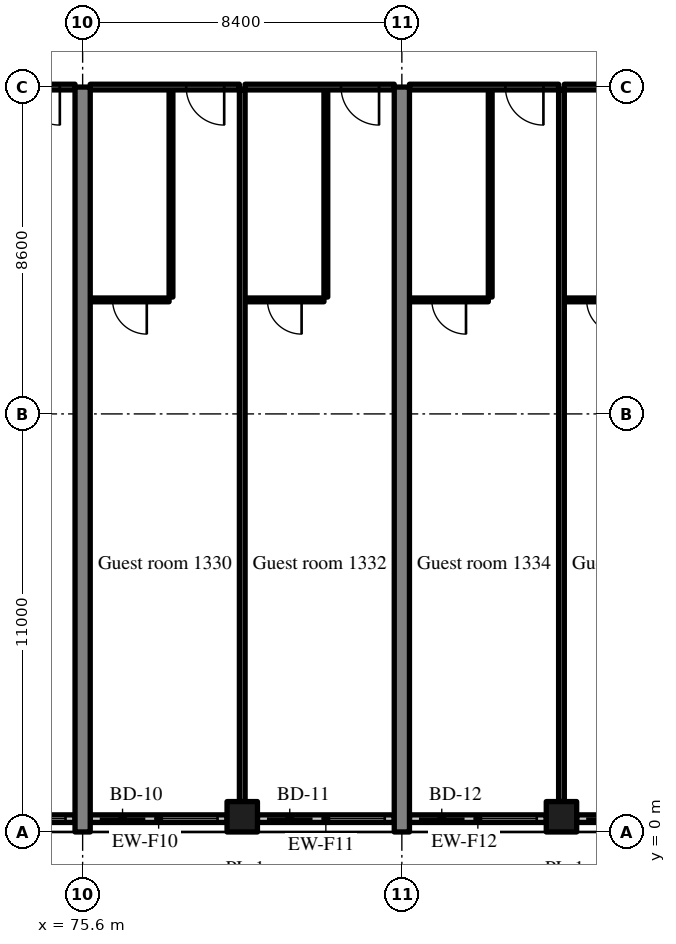
"""IFC4 building model, lengths in metres.
Left out: names, types, materials, properties, quantities, classifications, styles, units other than length and angle.
Written with IfcOpenShell. Run it as: python <this file> out.ifc"""

import sys

from ifc_helpers import new_model, si_unit, direction, frame, frame_2d, origin, origin_2d, place, context, subcontext, project, spatial, rectangle, extrude, source, transform, mapped, element, fill, save


model = new_model("IFC4")
c1 = context("Model", 3, precision=1e-05, world=origin(), true_north=direction((0.0, 1.0)))
c2 = subcontext(c1, "Body", "Model", "MODEL_VIEW")
j1 = project(units=[si_unit("LENGTHUNIT", "METRE"), si_unit("PLANEANGLEUNIT", "RADIAN")], contexts=[c1])
p1 = place(None, origin())
s1 = spatial("IfcSite", under=j1, at=p1, CompositionType="ELEMENT")
p2 = place(p1, origin())
s2 = spatial("IfcBuilding", under=s1, at=p2, CompositionType="ELEMENT")
p3 = place(p2, frame((0.0, 0.0, 58.2)))
s3 = spatial("IfcBuildingStorey", under=s2, at=p3, CompositionType="ELEMENT", Elevation=58.2)
m1 = source(origin(), c2, "Body", "SweptSolid", [
    extrude(rectangle(XDim=19.6, YDim=0.4, at=frame_2d((9.8, 0.0))), origin(), (0.0, 0.0, 1.0), 3.52),
])
for number, where, z_axis, x_axis in (
    (1, (75.6, 0.0, 0.0), (0.0, 0.0, 1.0), (0.0, 1.0, 0.0)),
    (2, (84.0, 0.0, 0.0), (0.0, 0.0, 1.0), (0.0, 1.0, 0.0)),
):
    element("IfcWall", number, at=place(p3, frame(where, z_axis=z_axis, x_axis=x_axis)), inside=s3, PredefinedType="SHEAR", context=c2, shape_type="MappedRepresentation", body=[
        mapped(m1, transform((0.0, 0.0, 0.0), scale=1.0)),
    ])
m2 = source(origin(), c2, "Body", "SweptSolid", [
    extrude(rectangle(XDim=0.8, YDim=0.8, at=origin_2d()), origin(), (0.0, 0.0, 1.0), 3.52),
])
for number, where, z_axis, x_axis in (
    (3, (79.8, 0.4, 0.0), (0.0, 0.0, 1.0), (1.0, 0.0, 0.0)),
    (4, (88.2, 0.4, 0.0), (0.0, 0.0, 1.0), (1.0, 0.0, 0.0)),
):
    element("IfcColumn", number, at=place(p3, frame(where, z_axis=z_axis, x_axis=x_axis)), inside=s3, PredefinedType="COLUMN", context=c2, shape_type="MappedRepresentation", body=[
        mapped(m2, transform((0.0, 0.0, 0.0), scale=1.0)),
    ])
m3 = source(origin(), c2, "Body", "SweptSolid", [
    extrude(rectangle(XDim=3.6, YDim=0.2, at=frame_2d((1.8, 0.0))), origin(), (0.0, 0.0, 1.0), 2.82),
])
p4 = place(p3, frame((71.8, 0.35, 0.0), z_axis=(0.0, 0.0, 1.0), x_axis=(1.0, 0.0, 0.0)))
e5 = element("IfcWall", 5, at=p4, inside=s3, PredefinedType="SOLIDWALL", context=c2, shape_type="MappedRepresentation", body=[
    mapped(m3, transform((0.0, 0.0, 0.0), scale=1.0)),
])
m4 = source(origin(), c2, "Body", "SweptSolid", [
    extrude(rectangle(XDim=1.2, YDim=2.4, at=frame_2d((0.6, 1.2))), frame((0.0, 0.11, 0.0), z_axis=(0.0, -1.0, 0.0), x_axis=(1.0, 0.0, 0.0)), (0.0, 0.0, 1.0), 0.22),
])
p5 = place(p4, frame((0.25, 0.0, 0.0)))
e6 = element("IfcOpeningElement", 6, at=p5, cuts=e5, PredefinedType="OPENING", context=c2, shape_type="MappedRepresentation", body=[
    mapped(m4, transform((0.0, 0.0, 0.0), scale=1.0)),
])
m5 = source(origin(), c2, "Body", "SweptSolid", [
    extrude(rectangle(XDim=1.5, YDim=1.5, at=frame_2d((0.75, 0.75))), frame((0.0, 0.11, 0.0), z_axis=(0.0, -1.0, 0.0), x_axis=(1.0, 0.0, 0.0)), (0.0, 0.0, 1.0), 0.22),
])
p6 = place(p4, frame((1.85, 0.0, 0.9)))
e7 = element("IfcOpeningElement", 7, at=p6, cuts=e5, PredefinedType="OPENING", context=c2, shape_type="MappedRepresentation", body=[
    mapped(m5, transform((0.0, 0.0, 0.0), scale=1.0)),
])
p7 = place(p3, frame((75.8, 0.35, 0.0), z_axis=(0.0, 0.0, 1.0), x_axis=(1.0, 0.0, 0.0)))
e8 = element("IfcWall", 8, at=p7, inside=s3, PredefinedType="SOLIDWALL", context=c2, shape_type="MappedRepresentation", body=[
    mapped(m3, transform((0.0, 0.0, 0.0), scale=1.0)),
])
p8 = place(p7, frame((0.25, 0.0, 0.0)))
e9 = element("IfcOpeningElement", 9, at=p8, cuts=e8, PredefinedType="OPENING", context=c2, shape_type="MappedRepresentation", body=[
    mapped(m4, transform((0.0, 0.0, 0.0), scale=1.0)),
])
p9 = place(p7, frame((1.85, 0.0, 0.9)))
e10 = element("IfcOpeningElement", 10, at=p9, cuts=e8, PredefinedType="OPENING", context=c2, shape_type="MappedRepresentation", body=[
    mapped(m5, transform((0.0, 0.0, 0.0), scale=1.0)),
])
m6 = source(origin(), c2, "Body", "SweptSolid", [
    extrude(rectangle(XDim=3.6, YDim=0.2, at=frame_2d((1.8, 0.0))), origin(), (0.0, 0.0, 1.0), 2.82),
])
p10 = place(p3, frame((80.2, 0.35, 0.0), z_axis=(0.0, 0.0, 1.0), x_axis=(1.0, 0.0, 0.0)))
e11 = element("IfcWall", 11, at=p10, inside=s3, PredefinedType="SOLIDWALL", context=c2, shape_type="MappedRepresentation", body=[
    mapped(m6, transform((0.0, 0.0, 0.0), scale=1.0)),
])
p11 = place(p10, frame((0.25, 0.0, 0.0)))
e12 = element("IfcOpeningElement", 12, at=p11, cuts=e11, PredefinedType="OPENING", context=c2, shape_type="MappedRepresentation", body=[
    mapped(m4, transform((0.0, 0.0, 0.0), scale=1.0)),
])
p12 = place(p10, frame((1.85, 0.0, 0.9)))
e13 = element("IfcOpeningElement", 13, at=p12, cuts=e11, PredefinedType="OPENING", context=c2, shape_type="MappedRepresentation", body=[
    mapped(m5, transform((0.0, 0.0, 0.0), scale=1.0)),
])
p13 = place(p3, frame((84.2, 0.35, 0.0), z_axis=(0.0, 0.0, 1.0), x_axis=(1.0, 0.0, 0.0)))
e14 = element("IfcWall", 14, at=p13, inside=s3, PredefinedType="SOLIDWALL", context=c2, shape_type="MappedRepresentation", body=[
    mapped(m6, transform((0.0, 0.0, 0.0), scale=1.0)),
])
p14 = place(p13, frame((0.25, 0.0, 0.0)))
e15 = element("IfcOpeningElement", 15, at=p14, cuts=e14, PredefinedType="OPENING", context=c2, shape_type="MappedRepresentation", body=[
    mapped(m4, transform((0.0, 0.0, 0.0), scale=1.0)),
])
p15 = place(p13, frame((1.85, 0.0, 0.9)))
e16 = element("IfcOpeningElement", 16, at=p15, cuts=e14, PredefinedType="OPENING", context=c2, shape_type="MappedRepresentation", body=[
    mapped(m5, transform((0.0, 0.0, 0.0), scale=1.0)),
])
p16 = place(p3, frame((88.6, 0.35, 0.0), z_axis=(0.0, 0.0, 1.0), x_axis=(1.0, 0.0, 0.0)))
e17 = element("IfcWall", 17, at=p16, inside=s3, PredefinedType="SOLIDWALL", context=c2, shape_type="MappedRepresentation", body=[
    mapped(m3, transform((0.0, 0.0, 0.0), scale=1.0)),
])
p17 = place(p16, frame((0.25, 0.0, 0.0)))
e18 = element("IfcOpeningElement", 18, at=p17, cuts=e17, PredefinedType="OPENING", context=c2, shape_type="MappedRepresentation", body=[
    mapped(m4, transform((0.0, 0.0, 0.0), scale=1.0)),
])
p18 = place(p16, frame((1.85, 0.0, 0.9)))
e19 = element("IfcOpeningElement", 19, at=p18, cuts=e17, PredefinedType="OPENING", context=c2, shape_type="MappedRepresentation", body=[
    mapped(m5, transform((0.0, 0.0, 0.0), scale=1.0)),
])
m7 = source(origin(), c2, "Body", "SweptSolid", [
    extrude(rectangle(XDim=8.0, YDim=0.15, at=frame_2d((4.0, 0.0))), origin(), (0.0, 0.0, 1.0), 2.82),
])
p19 = place(p3, frame((67.4, 19.6, 0.0), z_axis=(0.0, 0.0, 1.0), x_axis=(1.0, 0.0, 0.0)))
e20 = element("IfcWall", 20, at=p19, inside=s3, PredefinedType="PARTITIONING", context=c2, shape_type="MappedRepresentation", body=[
    mapped(m7, transform((0.0, 0.0, 0.0), scale=1.0)),
])
m8 = source(origin(), c2, "Body", "SweptSolid", [
    extrude(rectangle(XDim=1.0, YDim=2.1, at=frame_2d((0.5, 1.05))), frame((0.0, 0.085, 0.0), z_axis=(0.0, -1.0, 0.0), x_axis=(1.0, 0.0, 0.0)), (0.0, 0.0, 1.0), 0.17),
])
p20 = place(p19, frame((6.6, 0.0, 0.0)))
e21 = element("IfcOpeningElement", 21, at=p20, cuts=e20, PredefinedType="OPENING", context=c2, shape_type="MappedRepresentation", body=[
    mapped(m8, transform((0.0, 0.0, 0.0), scale=1.0)),
])
m9 = source(origin(), c2, "Body", "SweptSolid", [
    extrude(rectangle(XDim=5.45, YDim=0.1, at=frame_2d((2.725, 0.0))), origin(), (0.0, 0.0, 1.0), 3.52),
])
p21 = place(p3, frame((77.925, 14.075, 0.0), z_axis=(0.0, 0.0, 1.0), x_axis=(0.0, 1.0, 0.0)))
e22 = element("IfcWall", 22, at=p21, inside=s3, PredefinedType="PARTITIONING", context=c2, shape_type="MappedRepresentation", body=[
    mapped(m9, transform((0.0, 0.0, 0.0), scale=1.0)),
])
m10 = source(origin(), c2, "Body", "SweptSolid", [
    extrude(rectangle(XDim=2.075, YDim=0.1, at=frame_2d((1.038, 0.0))), origin(), (0.0, 0.0, 1.0), 3.52),
])
p22 = place(p3, frame((75.8, 14.0, 0.0), z_axis=(0.0, 0.0, 1.0), x_axis=(1.0, 0.0, 0.0)))
e23 = element("IfcWall", 23, at=p22, inside=s3, PredefinedType="PARTITIONING", context=c2, shape_type="MappedRepresentation", body=[
    mapped(m10, transform((0.0, 0.0, 0.0), scale=1.0)),
])
m11 = source(origin(), c2, "Body", "SweptSolid", [
    extrude(rectangle(XDim=0.9, YDim=2.1, at=frame_2d((0.45, 1.05))), frame((0.0, 0.06, 0.0), z_axis=(0.0, -1.0, 0.0), x_axis=(1.0, 0.0, 0.0)), (0.0, 0.0, 1.0), 0.12),
])
p23 = place(p22, frame((0.588, 0.0, 0.0)))
e24 = element("IfcOpeningElement", 24, at=p23, cuts=e23, PredefinedType="OPENING", context=c2, shape_type="MappedRepresentation", body=[
    mapped(m11, transform((0.0, 0.0, 0.0), scale=1.0)),
])
m12 = source(origin(), c2, "Body", "SweptSolid", [
    extrude(rectangle(XDim=3.925, YDim=0.15, at=frame_2d((1.962, 0.0))), origin(), (0.0, 0.0, 1.0), 2.82),
])
p24 = place(p3, frame((75.8, 19.6, 0.0), z_axis=(0.0, 0.0, 1.0), x_axis=(1.0, 0.0, 0.0)))
e25 = element("IfcWall", 25, at=p24, inside=s3, PredefinedType="PARTITIONING", context=c2, shape_type="MappedRepresentation", body=[
    mapped(m12, transform((0.0, 0.0, 0.0), scale=1.0)),
])
p25 = place(p24, frame((2.525, 0.0, 0.0)))
e26 = element("IfcOpeningElement", 26, at=p25, cuts=e25, PredefinedType="OPENING", context=c2, shape_type="MappedRepresentation", body=[
    mapped(m8, transform((0.0, 0.0, 0.0), scale=1.0)),
])
p26 = place(p3, frame((82.0, 14.075, 0.0), z_axis=(0.0, 0.0, 1.0), x_axis=(0.0, 1.0, 0.0)))
e27 = element("IfcWall", 27, at=p26, inside=s3, PredefinedType="PARTITIONING", context=c2, shape_type="MappedRepresentation", body=[
    mapped(m9, transform((0.0, 0.0, 0.0), scale=1.0)),
])
p27 = place(p3, frame((79.875, 14.0, 0.0), z_axis=(0.0, 0.0, 1.0), x_axis=(1.0, 0.0, 0.0)))
e28 = element("IfcWall", 28, at=p27, inside=s3, PredefinedType="PARTITIONING", context=c2, shape_type="MappedRepresentation", body=[
    mapped(m10, transform((0.0, 0.0, 0.0), scale=1.0)),
])
p28 = place(p27, frame((0.587, 0.0, 0.0)))
e29 = element("IfcOpeningElement", 29, at=p28, cuts=e28, PredefinedType="OPENING", context=c2, shape_type="MappedRepresentation", body=[
    mapped(m11, transform((0.0, 0.0, 0.0), scale=1.0)),
])
p29 = place(p3, frame((79.875, 19.6, 0.0), z_axis=(0.0, 0.0, 1.0), x_axis=(1.0, 0.0, 0.0)))
e30 = element("IfcWall", 30, at=p29, inside=s3, PredefinedType="PARTITIONING", context=c2, shape_type="MappedRepresentation", body=[
    mapped(m12, transform((0.0, 0.0, 0.0), scale=1.0)),
])
p30 = place(p29, frame((2.525, 0.0, 0.0)))
e31 = element("IfcOpeningElement", 31, at=p30, cuts=e30, PredefinedType="OPENING", context=c2, shape_type="MappedRepresentation", body=[
    mapped(m8, transform((0.0, 0.0, 0.0), scale=1.0)),
])
m13 = source(origin(), c2, "Body", "SweptSolid", [
    extrude(rectangle(XDim=18.725, YDim=0.15, at=frame_2d((9.362, 0.0))), origin(), (0.0, 0.0, 1.0), 3.52),
])
p31 = place(p3, frame((79.8, 0.8, 0.0), z_axis=(0.0, 0.0, 1.0), x_axis=(0.0, 1.0, 0.0)))
e32 = element("IfcWall", 32, at=p31, inside=s3, PredefinedType="PARTITIONING", context=c2, shape_type="MappedRepresentation", body=[
    mapped(m13, transform((0.0, 0.0, 0.0), scale=1.0)),
])
p32 = place(p3, frame((86.325, 14.075, 0.0), z_axis=(0.0, 0.0, 1.0), x_axis=(0.0, 1.0, 0.0)))
e33 = element("IfcWall", 33, at=p32, inside=s3, PredefinedType="PARTITIONING", context=c2, shape_type="MappedRepresentation", body=[
    mapped(m9, transform((0.0, 0.0, 0.0), scale=1.0)),
])
p33 = place(p3, frame((84.2, 14.0, 0.0), z_axis=(0.0, 0.0, 1.0), x_axis=(1.0, 0.0, 0.0)))
e34 = element("IfcWall", 34, at=p33, inside=s3, PredefinedType="PARTITIONING", context=c2, shape_type="MappedRepresentation", body=[
    mapped(m10, transform((0.0, 0.0, 0.0), scale=1.0)),
])
p34 = place(p33, frame((0.588, 0.0, 0.0)))
e35 = element("IfcOpeningElement", 35, at=p34, cuts=e34, PredefinedType="OPENING", context=c2, shape_type="MappedRepresentation", body=[
    mapped(m11, transform((0.0, 0.0, 0.0), scale=1.0)),
])
p35 = place(p3, frame((84.2, 19.6, 0.0), z_axis=(0.0, 0.0, 1.0), x_axis=(1.0, 0.0, 0.0)))
e36 = element("IfcWall", 36, at=p35, inside=s3, PredefinedType="PARTITIONING", context=c2, shape_type="MappedRepresentation", body=[
    mapped(m12, transform((0.0, 0.0, 0.0), scale=1.0)),
])
p36 = place(p35, frame((2.525, 0.0, 0.0)))
e37 = element("IfcOpeningElement", 37, at=p36, cuts=e36, PredefinedType="OPENING", context=c2, shape_type="MappedRepresentation", body=[
    mapped(m8, transform((0.0, 0.0, 0.0), scale=1.0)),
])
m14 = source(origin(), c2, "Body", "SweptSolid", [
    extrude(rectangle(XDim=2.075, YDim=0.1, at=frame_2d((1.038, 0.0))), origin(), (0.0, 0.0, 1.0), 3.52),
])
p37 = place(p3, frame((88.275, 14.0, 0.0), z_axis=(0.0, 0.0, 1.0), x_axis=(1.0, 0.0, 0.0)))
e38 = element("IfcWall", 38, at=p37, inside=s3, PredefinedType="PARTITIONING", context=c2, shape_type="MappedRepresentation", body=[
    mapped(m14, transform((0.0, 0.0, 0.0), scale=1.0)),
])
p38 = place(p37, frame((0.587, 0.0, 0.0)))
e39 = element("IfcOpeningElement", 39, at=p38, cuts=e38, PredefinedType="OPENING", context=c2, shape_type="MappedRepresentation", body=[
    mapped(m11, transform((0.0, 0.0, 0.0), scale=1.0)),
])
p39 = place(p3, frame((88.275, 19.6, 0.0), z_axis=(0.0, 0.0, 1.0), x_axis=(1.0, 0.0, 0.0)))
e40 = element("IfcWall", 40, at=p39, inside=s3, PredefinedType="PARTITIONING", context=c2, shape_type="MappedRepresentation", body=[
    mapped(m12, transform((0.0, 0.0, 0.0), scale=1.0)),
])
p40 = place(p39, frame((2.525, 0.0, 0.0)))
e41 = element("IfcOpeningElement", 41, at=p40, cuts=e40, PredefinedType="OPENING", context=c2, shape_type="MappedRepresentation", body=[
    mapped(m8, transform((0.0, 0.0, 0.0), scale=1.0)),
])
p41 = place(p3, frame((88.2, 0.8, 0.0), z_axis=(0.0, 0.0, 1.0), x_axis=(0.0, 1.0, 0.0)))
e42 = element("IfcWall", 42, at=p41, inside=s3, PredefinedType="PARTITIONING", context=c2, shape_type="MappedRepresentation", body=[
    mapped(m13, transform((0.0, 0.0, 0.0), scale=1.0)),
])
m15 = source(origin(), c2, "Body", "SweptSolid", [
    extrude(rectangle(XDim=1.5, YDim=1.5, at=frame_2d((0.75, 0.75))), frame((0.0, 0.03, 0.0), z_axis=(0.0, -1.0, 0.0), x_axis=(1.0, 0.0, 0.0)), (0.0, 0.0, 1.0), 0.06),
])
p42 = place(p6, origin())
e43 = element("IfcWindow", 43, at=p42, inside=s3, PartitioningType="SINGLE_PANEL", PredefinedType="WINDOW", context=c2, shape_type="MappedRepresentation", body=[
    mapped(m15, transform((0.0, 0.0, 0.0), scale=1.0)),
])
fill(e7, e43)
m16 = source(origin(), c2, "Body", "SweptSolid", [
    extrude(rectangle(XDim=1.2, YDim=2.4, at=frame_2d((0.6, 1.2))), frame((0.0, 0.025, 0.0), z_axis=(0.0, -1.0, 0.0), x_axis=(1.0, 0.0, 0.0)), (0.0, 0.0, 1.0), 0.05),
])
p43 = place(p8, origin())
e44 = element("IfcDoor", 44, at=p43, inside=s3, OperationType="SLIDING_TO_RIGHT", PredefinedType="DOOR", context=c2, shape_type="MappedRepresentation", body=[
    mapped(m16, transform((0.0, 0.0, 0.0), scale=1.0)),
])
fill(e9, e44)
p44 = place(p9, origin())
e45 = element("IfcWindow", 45, at=p44, inside=s3, PartitioningType="SINGLE_PANEL", PredefinedType="WINDOW", context=c2, shape_type="MappedRepresentation", body=[
    mapped(m15, transform((0.0, 0.0, 0.0), scale=1.0)),
])
fill(e10, e45)
p45 = place(p11, origin())
e46 = element("IfcDoor", 46, at=p45, inside=s3, OperationType="SLIDING_TO_LEFT", PredefinedType="DOOR", context=c2, shape_type="MappedRepresentation", body=[
    mapped(m16, transform((0.0, 0.0, 0.0), scale=1.0)),
])
fill(e12, e46)
p46 = place(p12, origin())
e47 = element("IfcWindow", 47, at=p46, inside=s3, PartitioningType="SINGLE_PANEL", PredefinedType="WINDOW", context=c2, shape_type="MappedRepresentation", body=[
    mapped(m15, transform((0.0, 0.0, 0.0), scale=1.0)),
])
fill(e13, e47)
p47 = place(p14, origin())
e48 = element("IfcDoor", 48, at=p47, inside=s3, OperationType="SLIDING_TO_RIGHT", PredefinedType="DOOR", context=c2, shape_type="MappedRepresentation", body=[
    mapped(m16, transform((0.0, 0.0, 0.0), scale=1.0)),
])
fill(e15, e48)
p48 = place(p15, origin())
e49 = element("IfcWindow", 49, at=p48, inside=s3, PartitioningType="SINGLE_PANEL", PredefinedType="WINDOW", context=c2, shape_type="MappedRepresentation", body=[
    mapped(m15, transform((0.0, 0.0, 0.0), scale=1.0)),
])
fill(e16, e49)
p49 = place(p17, origin())
e50 = element("IfcDoor", 50, at=p49, inside=s3, OperationType="SLIDING_TO_LEFT", PredefinedType="DOOR", context=c2, shape_type="MappedRepresentation", body=[
    mapped(m16, transform((0.0, 0.0, 0.0), scale=1.0)),
])
fill(e18, e50)
m17 = source(origin(), c2, "Body", "SweptSolid", [
    extrude(rectangle(XDim=1.0, YDim=2.1, at=frame_2d((0.5, 1.05))), frame((0.0, 0.025, 0.0), z_axis=(0.0, -1.0, 0.0), x_axis=(1.0, 0.0, 0.0)), (0.0, 0.0, 1.0), 0.05),
])
p50 = place(p20, origin())
e51 = element("IfcDoor", 51, at=p50, inside=s3, OperationType="SINGLE_SWING_RIGHT", PredefinedType="DOOR", context=c2, shape_type="MappedRepresentation", body=[
    mapped(m17, transform((0.0, 0.0, 0.0), scale=1.0)),
])
fill(e21, e51)
m18 = source(origin(), c2, "Body", "SweptSolid", [
    extrude(rectangle(XDim=0.9, YDim=2.1, at=frame_2d((0.45, 1.05))), frame((0.0, 0.025, 0.0), z_axis=(0.0, -1.0, 0.0), x_axis=(1.0, 0.0, 0.0)), (0.0, 0.0, 1.0), 0.05),
])
p51 = place(p23, origin())
e52 = element("IfcDoor", 52, at=p51, inside=s3, OperationType="SINGLE_SWING_RIGHT", PredefinedType="DOOR", context=c2, shape_type="MappedRepresentation", body=[
    mapped(m18, transform((0.0, 0.0, 0.0), scale=1.0)),
])
fill(e24, e52)
p52 = place(p25, origin())
e53 = element("IfcDoor", 53, at=p52, inside=s3, OperationType="SINGLE_SWING_RIGHT", PredefinedType="DOOR", context=c2, shape_type="MappedRepresentation", body=[
    mapped(m17, transform((0.0, 0.0, 0.0), scale=1.0)),
])
fill(e26, e53)
p53 = place(p28, origin())
e54 = element("IfcDoor", 54, at=p53, inside=s3, OperationType="SINGLE_SWING_RIGHT", PredefinedType="DOOR", context=c2, shape_type="MappedRepresentation", body=[
    mapped(m18, transform((0.0, 0.0, 0.0), scale=1.0)),
])
fill(e29, e54)
p54 = place(p30, origin())
e55 = element("IfcDoor", 55, at=p54, inside=s3, OperationType="SINGLE_SWING_RIGHT", PredefinedType="DOOR", context=c2, shape_type="MappedRepresentation", body=[
    mapped(m17, transform((0.0, 0.0, 0.0), scale=1.0)),
])
fill(e31, e55)
p55 = place(p34, origin())
e56 = element("IfcDoor", 56, at=p55, inside=s3, OperationType="SINGLE_SWING_RIGHT", PredefinedType="DOOR", context=c2, shape_type="MappedRepresentation", body=[
    mapped(m18, transform((0.0, 0.0, 0.0), scale=1.0)),
])
fill(e35, e56)
p56 = place(p36, origin())
e57 = element("IfcDoor", 57, at=p56, inside=s3, OperationType="SINGLE_SWING_RIGHT", PredefinedType="DOOR", context=c2, shape_type="MappedRepresentation", body=[
    mapped(m17, transform((0.0, 0.0, 0.0), scale=1.0)),
])
fill(e37, e57)
p57 = place(p38, origin())
e58 = element("IfcDoor", 58, at=p57, inside=s3, OperationType="SINGLE_SWING_RIGHT", PredefinedType="DOOR", context=c2, shape_type="MappedRepresentation", body=[
    mapped(m18, transform((0.0, 0.0, 0.0), scale=1.0)),
])
fill(e39, e58)
save(model, sys.argv[1])
